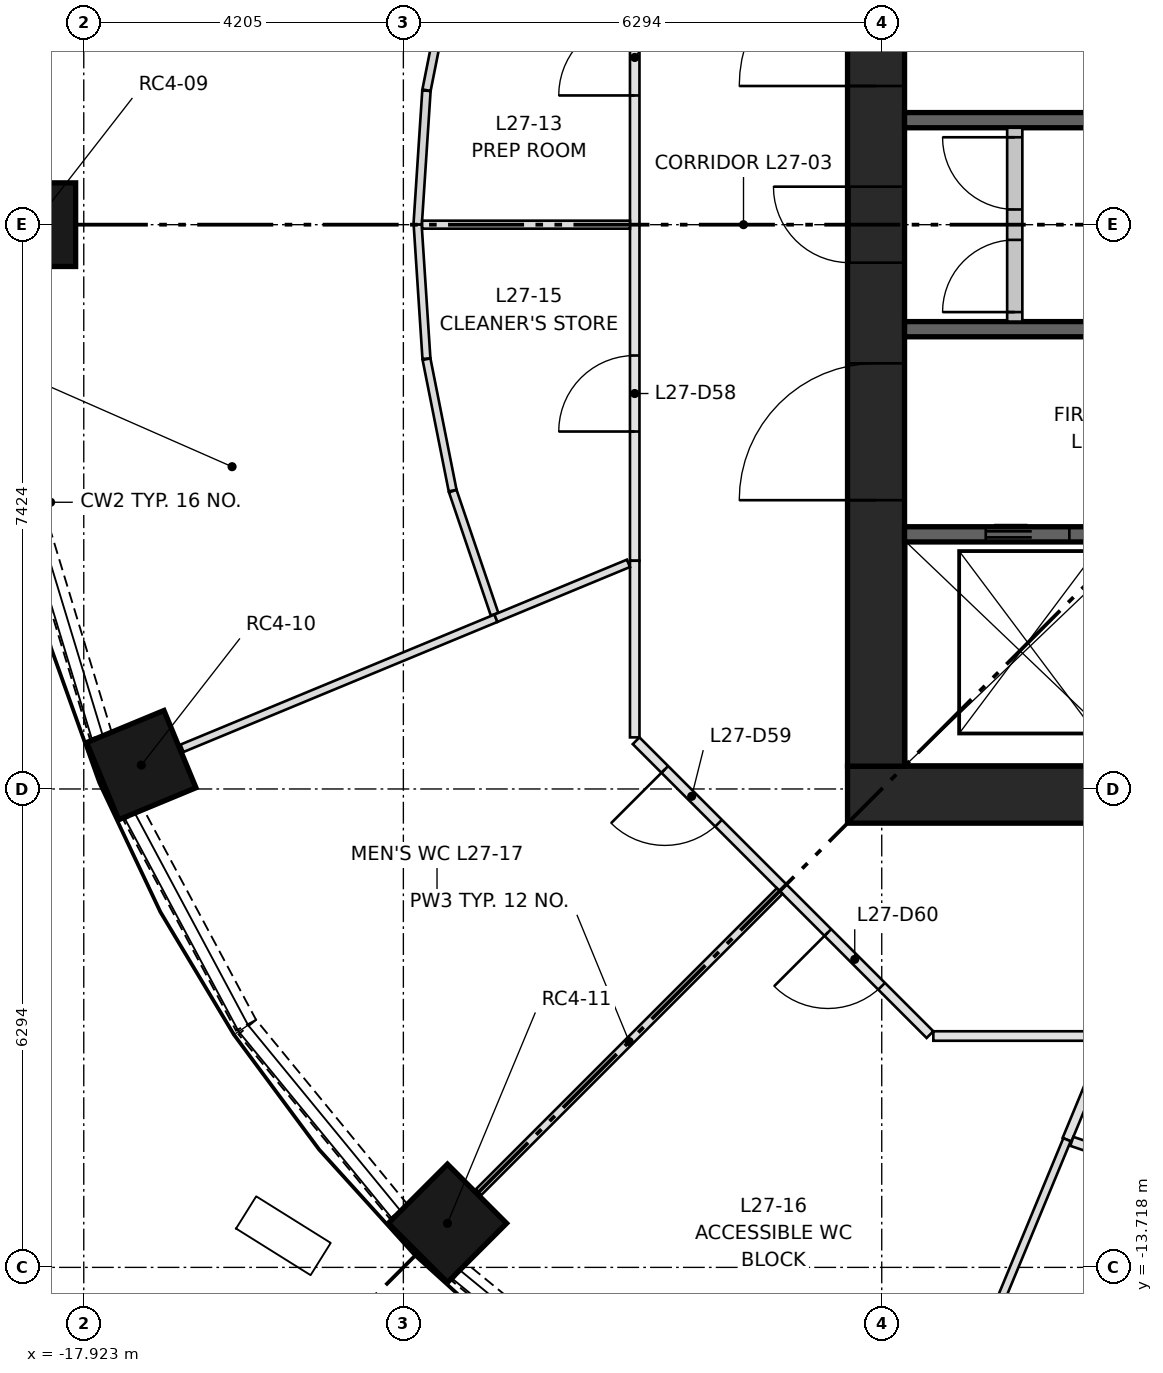
"""IFC4 building model, lengths in metres.
Left out: names, types, materials, properties, quantities, classifications, styles, units other than length and angle.
Written with IfcOpenShell. Run it as: python <this file> out.ifc"""

import sys

from ifc_helpers import new_model, si_unit, direction, frame, frame_2d, origin, origin_2d, place, context, subcontext, project, spatial, rectangle, extrude, element, fill, save


model = new_model("IFC4")
c1 = context("Model", 3, precision=1e-05, world=origin(), true_north=direction((0.0, 1.0)))
c2 = subcontext(c1, "Body", "Model", "MODEL_VIEW")
j1 = project(units=[si_unit("LENGTHUNIT", "METRE"), si_unit("PLANEANGLEUNIT", "RADIAN")], contexts=[c1])
p1 = place(None, origin())
s1 = spatial("IfcSite", under=j1, at=p1, CompositionType="ELEMENT")
p2 = place(p1, origin())
s2 = spatial("IfcBuilding", under=s1, at=p2, CompositionType="ELEMENT")
p3 = place(p2, frame((0.0, 0.0, 105.6)))
s3 = spatial("IfcBuildingStorey", under=s2, at=p3, CompositionType="ELEMENT", Elevation=105.6)
for number, where, z_axis, x_axis in (
    (1, (-18.58, 0.0, 0.0), (0.0, 0.0, 1.0), (-1.0, 0.0, 0.0)),
    (2, (-17.166, -7.11, 0.0), (0.0, 0.0, 1.0), (-0.924, -0.383, 0.0)),
    (3, (-13.138, -13.138, 0.0), (0.0, 0.0, 1.0), (-0.707, -0.707, 0.0)),
):
    element("IfcColumn", number, at=place(p3, frame(where, z_axis=z_axis, x_axis=x_axis)), inside=s3, PredefinedType="COLUMN", context=c2, shape_type="SweptSolid", body=[
        extrude(rectangle(XDim=1.1, YDim=1.1, at=origin_2d()), origin(), (0.0, 0.0, 1.0), 3.65),
    ])
p4 = place(p3, frame((-7.874, -7.499, 0.0), z_axis=(0.0, 0.0, 1.0), x_axis=(1.0, 0.0, 0.0)))
e4 = element("IfcWall", 4, at=p4, inside=s3, PredefinedType="SHEAR", context=c2, shape_type="SweptSolid", body=[
    extrude(rectangle(XDim=15.748, YDim=0.75, at=frame_2d((7.874, 0.0))), origin(), (0.0, 0.0, 1.0), 3.65),
])
p5 = place(p3, frame((-7.499, -7.124, 0.0), z_axis=(0.0, 0.0, 1.0), x_axis=(0.0, 1.0, 0.0)))
e5 = element("IfcWall", 5, at=p5, inside=s3, PredefinedType="SHEAR", context=c2, shape_type="SweptSolid", body=[
    extrude(rectangle(XDim=14.248, YDim=0.75, at=frame_2d((7.124, 0.0))), origin(), (0.0, 0.0, 1.0), 3.65),
])
p6 = place(p5, frame((6.624, 0.0, 0.0)))
e6 = element("IfcOpeningElement", 6, at=p6, cuts=e5, PredefinedType="OPENING", context=c2, shape_type="SweptSolid", body=[
    extrude(rectangle(XDim=1.0, YDim=2.1, at=frame_2d((0.5, 1.05))), frame((0.0, 0.385, 0.0), z_axis=(0.0, -1.0, 0.0), x_axis=(1.0, 0.0, 0.0)), (0.0, 0.0, 1.0), 0.77),
])
p7 = place(p5, frame((3.5, 0.0, 0.0)))
e7 = element("IfcOpeningElement", 7, at=p7, cuts=e5, PredefinedType="OPENING", context=c2, shape_type="SweptSolid", body=[
    extrude(rectangle(XDim=1.8, YDim=2.1, at=frame_2d((0.9, 1.05))), frame((0.0, 0.385, 0.0), z_axis=(0.0, -1.0, 0.0), x_axis=(1.0, 0.0, 0.0)), (0.0, 0.0, 1.0), 0.77),
])
p8 = place(p5, frame((8.948, 0.0, 0.0)))
e8 = element("IfcOpeningElement", 8, at=p8, cuts=e5, PredefinedType="OPENING", context=c2, shape_type="SweptSolid", body=[
    extrude(rectangle(XDim=1.8, YDim=2.1, at=frame_2d((0.9, 1.05))), frame((0.0, 0.385, 0.0), z_axis=(0.0, -1.0, 0.0), x_axis=(1.0, 0.0, 0.0)), (0.0, 0.0, 1.0), 0.77),
])
p9 = place(p5, frame((12.124, 0.0, 0.0)))
e9 = element("IfcOpeningElement", 9, at=p9, cuts=e5, PredefinedType="OPENING", context=c2, shape_type="SweptSolid", body=[
    extrude(rectangle(XDim=1.0, YDim=2.1, at=frame_2d((0.5, 1.05))), frame((0.0, 0.385, 0.0), z_axis=(0.0, -1.0, 0.0), x_axis=(1.0, 0.0, 0.0)), (0.0, 0.0, 1.0), 0.77),
])
p10 = place(p3, frame((-7.124, -4.074, 0.0), z_axis=(0.0, 0.0, 1.0), x_axis=(1.0, 0.0, 0.0)))
e10 = element("IfcWall", 10, at=p10, inside=s3, PredefinedType="SHEAR", context=c2, shape_type="SweptSolid", body=[
    extrude(rectangle(XDim=14.248, YDim=0.2, at=frame_2d((7.124, 0.0))), origin(), (0.0, 0.0, 1.0), 3.3),
])
p11 = place(p10, frame((1.069, 0.0, 0.0)))
e11 = element("IfcOpeningElement", 11, at=p11, cuts=e10, PredefinedType="OPENING", context=c2, shape_type="SweptSolid", body=[
    extrude(rectangle(XDim=1.1, YDim=2.1, at=frame_2d((0.55, 1.05))), frame((0.0, 0.11, 0.0), z_axis=(0.0, -1.0, 0.0), x_axis=(1.0, 0.0, 0.0)), (0.0, 0.0, 1.0), 0.22),
])
p12 = place(p10, frame((4.206, 0.0, 0.0)))
e12 = element("IfcOpeningElement", 12, at=p12, cuts=e10, PredefinedType="OPENING", context=c2, shape_type="SweptSolid", body=[
    extrude(rectangle(XDim=1.1, YDim=2.1, at=frame_2d((0.55, 1.05))), frame((0.0, 0.11, 0.0), z_axis=(0.0, -1.0, 0.0), x_axis=(1.0, 0.0, 0.0)), (0.0, 0.0, 1.0), 0.22),
])
p13 = place(p10, frame((6.808, 0.0, 0.0)))
e13 = element("IfcOpeningElement", 13, at=p13, cuts=e10, PredefinedType="OPENING", context=c2, shape_type="SweptSolid", body=[
    extrude(rectangle(XDim=1.0, YDim=2.1, at=frame_2d((0.5, 1.05))), frame((0.0, 0.11, 0.0), z_axis=(0.0, -1.0, 0.0), x_axis=(1.0, 0.0, 0.0)), (0.0, 0.0, 1.0), 0.22),
])
p14 = place(p10, frame((8.777, 0.0, 0.0)))
e14 = element("IfcOpeningElement", 14, at=p14, cuts=e10, PredefinedType="OPENING", context=c2, shape_type="SweptSolid", body=[
    extrude(rectangle(XDim=1.0, YDim=2.1, at=frame_2d((0.5, 1.05))), frame((0.0, 0.11, 0.0), z_axis=(0.0, -1.0, 0.0), x_axis=(1.0, 0.0, 0.0)), (0.0, 0.0, 1.0), 0.22),
])
p15 = place(p10, frame((10.745, 0.0, 0.0)))
e15 = element("IfcOpeningElement", 15, at=p15, cuts=e10, PredefinedType="OPENING", context=c2, shape_type="SweptSolid", body=[
    extrude(rectangle(XDim=1.0, YDim=2.1, at=frame_2d((0.5, 1.05))), frame((0.0, 0.11, 0.0), z_axis=(0.0, -1.0, 0.0), x_axis=(1.0, 0.0, 0.0)), (0.0, 0.0, 1.0), 0.22),
])
p16 = place(p10, frame((12.714, 0.0, 0.0)))
e16 = element("IfcOpeningElement", 16, at=p16, cuts=e10, PredefinedType="OPENING", context=c2, shape_type="SweptSolid", body=[
    extrude(rectangle(XDim=1.0, YDim=2.1, at=frame_2d((0.5, 1.05))), frame((0.0, 0.11, 0.0), z_axis=(0.0, -1.0, 0.0), x_axis=(1.0, 0.0, 0.0)), (0.0, 0.0, 1.0), 0.22),
])
for number, where, z_axis, x_axis in (
    (17, (-7.124, -1.375, 0.0), (0.0, 0.0, 1.0), (1.0, 0.0, 0.0)),
    (18, (-7.124, 1.375, 0.0), (0.0, 0.0, 1.0), (1.0, 0.0, 0.0)),
):
    element("IfcWall", number, at=place(p3, frame(where, z_axis=z_axis, x_axis=x_axis)), inside=s3, PredefinedType="SHEAR", context=c2, shape_type="SweptSolid", body=[
        extrude(rectangle(XDim=2.75, YDim=0.2, at=frame_2d((1.375, 0.0))), origin(), (0.0, 0.0, 1.0), 3.3),
    ])
p17 = place(p3, frame((-5.674, -1.275, 0.0), z_axis=(0.0, 0.0, 1.0), x_axis=(0.0, 1.0, 0.0)))
e19 = element("IfcWall", 19, at=p17, inside=s3, PredefinedType="PARTITIONING", context=c2, shape_type="SweptSolid", body=[
    extrude(rectangle(XDim=2.55, YDim=0.2, at=frame_2d((1.275, 0.0))), origin(), (0.0, 0.0, 1.0), 3.3),
])
p18 = place(p17, frame((0.125, 0.0, 0.0)))
e20 = element("IfcOpeningElement", 20, at=p18, cuts=e19, PredefinedType="OPENING", context=c2, shape_type="SweptSolid", body=[
    extrude(rectangle(XDim=0.95, YDim=2.1, at=frame_2d((0.475, 1.05))), frame((0.0, 0.11, 0.0), z_axis=(0.0, -1.0, 0.0), x_axis=(1.0, 0.0, 0.0)), (0.0, 0.0, 1.0), 0.22),
])
p19 = place(p17, frame((1.475, 0.0, 0.0)))
e21 = element("IfcOpeningElement", 21, at=p19, cuts=e19, PredefinedType="OPENING", context=c2, shape_type="SweptSolid", body=[
    extrude(rectangle(XDim=0.95, YDim=2.1, at=frame_2d((0.475, 1.05))), frame((0.0, 0.11, 0.0), z_axis=(0.0, -1.0, 0.0), x_axis=(1.0, 0.0, 0.0)), (0.0, 0.0, 1.0), 0.22),
])
p20 = place(p3, frame((-18.611, -3.717, 0.0), z_axis=(0.0, 0.0, 1.0), x_axis=(0.290214584271, -0.956961595403, 0.0)))
e22 = element("IfcWall", 22, at=p20, inside=s3, PredefinedType="SOLIDWALL", context=c2, shape_type="SweptSolid", body=[
    extrude(rectangle(XDim=3.139, YDim=0.3, at=frame_2d((1.57, 0.0))), origin(), (0.0, 0.0, 1.0), 0.9),
])
p21 = place(p3, frame((-17.268, -7.763, 0.0), z_axis=(0.0, 0.0, 1.0), x_axis=(0.471375185282, -0.88193278355, 0.0)))
e23 = element("IfcWall", 23, at=p21, inside=s3, PredefinedType="SOLIDWALL", context=c2, shape_type="SweptSolid", body=[
    extrude(rectangle(XDim=3.139, YDim=0.3, at=frame_2d((1.57, 0.0))), origin(), (0.0, 0.0, 1.0), 0.9),
])
for number, where, z_axis, x_axis in (
    (24, (-15.771, -10.557, 0.0), (0.0, 0.0, 1.0), (0.634, -0.773, 0.0)),
    (25, (-12.983, -13.781, 0.0), (0.0, 0.0, 1.0), (0.773, -0.634, 0.0)),
):
    element("IfcWall", number, at=place(p3, frame(where, z_axis=z_axis, x_axis=x_axis)), inside=s3, PredefinedType="SOLIDWALL", context=c2, shape_type="SweptSolid", body=[
        extrude(rectangle(XDim=3.139, YDim=0.3, at=frame_2d((1.569, 0.0))), origin(), (0.0, 0.0, 1.0), 0.9),
    ])
p22 = place(p3, frame((-10.674, 0.0, 0.0), z_axis=(0.0, 0.0, 1.0), x_axis=(0.0, 1.0, 0.0)))
e26 = element("IfcWall", 26, at=p22, inside=s3, PredefinedType="PARTITIONING", context=c2, shape_type="SweptSolid", body=[
    extrude(rectangle(XDim=4.421, YDim=0.125, at=frame_2d((2.211, 0.0))), origin(), (0.0, 0.0, 1.0), 3.3),
])
p23 = place(p22, frame((1.7, 0.0, 0.0)))
e27 = element("IfcOpeningElement", 27, at=p23, cuts=e26, PredefinedType="OPENING", context=c2, shape_type="SweptSolid", body=[
    extrude(rectangle(XDim=1.0, YDim=2.1, at=frame_2d((0.5, 1.05))), frame((0.0, 0.073, 0.0), z_axis=(0.0, -1.0, 0.0), x_axis=(1.0, 0.0, 0.0)), (0.0, 0.0, 1.0), 0.145),
])
p24 = place(p3, frame((-10.674, -4.421, 0.0), z_axis=(0.0, 0.0, 1.0), x_axis=(0.0, 1.0, 0.0)))
e28 = element("IfcWall", 28, at=p24, inside=s3, PredefinedType="PARTITIONING", context=c2, shape_type="SweptSolid", body=[
    extrude(rectangle(XDim=4.421, YDim=0.125, at=frame_2d((2.211, 0.0))), origin(), (0.0, 0.0, 1.0), 3.3),
])
p25 = place(p24, frame((1.7, 0.0, 0.0)))
e29 = element("IfcOpeningElement", 29, at=p25, cuts=e28, PredefinedType="OPENING", context=c2, shape_type="SweptSolid", body=[
    extrude(rectangle(XDim=1.0, YDim=2.1, at=frame_2d((0.5, 1.05))), frame((0.0, 0.073, 0.0), z_axis=(0.0, -1.0, 0.0), x_axis=(1.0, 0.0, 0.0)), (0.0, 0.0, 1.0), 0.145),
])
p26 = place(p3, frame((-10.674, -6.745, 0.0), z_axis=(0.0, 0.0, 1.0), x_axis=(0.0, 1.0, 0.0)))
e30 = element("IfcWall", 30, at=p26, inside=s3, PredefinedType="PARTITIONING", context=c2, shape_type="SweptSolid", body=[
    extrude(rectangle(XDim=2.324, YDim=0.125, at=frame_2d((1.162, 0.0))), origin(), (0.0, 0.0, 1.0), 3.3),
])
p27 = place(p3, frame((-8.722, -8.722, 0.0), z_axis=(0.0, 0.0, 1.0), x_axis=(-0.707151428813, 0.707062130741, 0.0)))
e31 = element("IfcWall", 31, at=p27, inside=s3, PredefinedType="PARTITIONING", context=c2, shape_type="SweptSolid", body=[
    extrude(rectangle(XDim=2.734, YDim=0.125, at=frame_2d((1.367, 0.0))), origin(), (0.0, 0.0, 1.0), 3.3),
])
p28 = place(p27, frame((1.2, 0.0, 0.0)))
e32 = element("IfcOpeningElement", 32, at=p28, cuts=e31, PredefinedType="OPENING", context=c2, shape_type="SweptSolid", body=[
    extrude(rectangle(XDim=1.0, YDim=2.1, at=frame_2d((0.5, 1.05))), frame((0.0, 0.073, 0.0), z_axis=(0.0, -1.0, 0.0), x_axis=(1.0, 0.0, 0.0)), (0.0, 0.0, 1.0), 0.145),
])
p29 = place(p3, frame((-6.789, -10.656, 0.0), z_axis=(0.0, 0.0, 1.0), x_axis=(-0.707062130741, 0.707151428813, 0.0)))
e33 = element("IfcWall", 33, at=p29, inside=s3, PredefinedType="PARTITIONING", context=c2, shape_type="SweptSolid", body=[
    extrude(rectangle(XDim=2.734, YDim=0.125, at=frame_2d((1.367, 0.0))), origin(), (0.0, 0.0, 1.0), 3.3),
])
p30 = place(p29, frame((0.9, 0.0, 0.0)))
e34 = element("IfcOpeningElement", 34, at=p30, cuts=e33, PredefinedType="OPENING", context=c2, shape_type="SweptSolid", body=[
    extrude(rectangle(XDim=1.0, YDim=2.1, at=frame_2d((0.5, 1.05))), frame((0.0, 0.073, 0.0), z_axis=(0.0, -1.0, 0.0), x_axis=(1.0, 0.0, 0.0)), (0.0, 0.0, 1.0), 0.145),
])
p31 = place(p3, frame((-4.359, -10.674, 0.0), z_axis=(0.0, 0.0, 1.0), x_axis=(-1.0, 0.0, 0.0)))
e35 = element("IfcWall", 35, at=p31, inside=s3, PredefinedType="PARTITIONING", context=c2, shape_type="SweptSolid", body=[
    extrude(rectangle(XDim=2.386, YDim=0.125, at=frame_2d((1.193, 0.0))), origin(), (0.0, 0.0, 1.0), 3.3),
])
p32 = place(p3, frame((-13.53, 0.0, 0.0), z_axis=(0.0, 0.0, 1.0), x_axis=(0.06551898146, 0.997851323128, 0.0)))
e36 = element("IfcWall", 36, at=p32, inside=s3, PredefinedType="PARTITIONING", context=c2, shape_type="SweptSolid", body=[
    extrude(rectangle(XDim=1.766, YDim=0.11, at=frame_2d((0.883, 0.0))), origin(), (0.0, 0.0, 1.0), 3.3),
])
p33 = place(p3, frame((-13.414, 1.77, 0.0), z_axis=(0.0, 0.0, 1.0), x_axis=(0.195157142921, 0.980771986532, 0.0)))
e37 = element("IfcWall", 37, at=p33, inside=s3, PredefinedType="PARTITIONING", context=c2, shape_type="SweptSolid", body=[
    extrude(rectangle(XDim=1.763, YDim=0.11, at=frame_2d((0.881, 0.0))), origin(), (0.0, 0.0, 1.0), 3.3),
])
p34 = place(p3, frame((-10.737, 0.0, 0.0), z_axis=(0.0, 0.0, 1.0), x_axis=(-1.0, 0.0, 0.0)))
e38 = element("IfcWall", 38, at=p34, inside=s3, PredefinedType="PARTITIONING", context=c2, shape_type="SweptSolid", body=[
    extrude(rectangle(XDim=2.735, YDim=0.105, at=frame_2d((1.367, 0.0))), origin(), (0.0, 0.0, 1.0), 3.3),
])
p35 = place(p3, frame((-13.53, 0.0, 0.0), z_axis=(0.0, 0.0, 1.0), x_axis=(0.065509945756, -0.997851916372, 0.0)))
e39 = element("IfcWall", 39, at=p35, inside=s3, PredefinedType="PARTITIONING", context=c2, shape_type="SweptSolid", body=[
    extrude(rectangle(XDim=1.767, YDim=0.105, at=frame_2d((0.883, 0.0))), origin(), (0.0, 0.0, 1.0), 3.3),
])
p36 = place(p3, frame((-13.414, -1.769, 0.0), z_axis=(0.0, 0.0, 1.0), x_axis=(0.19513063546, -0.980777260699, 0.0)))
e40 = element("IfcWall", 40, at=p36, inside=s3, PredefinedType="PARTITIONING", context=c2, shape_type="SweptSolid", body=[
    extrude(rectangle(XDim=1.763, YDim=0.105, at=frame_2d((0.881, 0.0))), origin(), (0.0, 0.0, 1.0), 3.3),
])
p37 = place(p3, frame((-13.068, -3.505, 0.0), z_axis=(0.0, 0.0, 1.0), x_axis=(0.321490655205, -0.946912751322, 0.0)))
e41 = element("IfcWall", 41, at=p37, inside=s3, PredefinedType="PARTITIONING", context=c2, shape_type="SweptSolid", body=[
    extrude(rectangle(XDim=1.71, YDim=0.105, at=frame_2d((0.855, 0.0))), origin(), (0.0, 0.0, 1.0), 3.3),
])
p38 = place(p3, frame((-12.5, -5.178, 0.0), z_axis=(0.0, 0.0, 1.0), x_axis=(-0.923895686767, -0.382644430213, 0.0)))
e42 = element("IfcWall", 42, at=p38, inside=s3, PredefinedType="PARTITIONING", context=c2, shape_type="SweptSolid", body=[
    extrude(rectangle(XDim=4.47, YDim=0.105, at=frame_2d((2.235, 0.0))), origin(), (0.0, 0.0, 1.0), 3.3),
])
p39 = place(p3, frame((-10.757, -4.456, 0.0), z_axis=(0.0, 0.0, 1.0), x_axis=(-0.923874914803, -0.382694580309, 0.0)))
e43 = element("IfcWall", 43, at=p39, inside=s3, PredefinedType="PARTITIONING", context=c2, shape_type="SweptSolid", body=[
    extrude(rectangle(XDim=1.887, YDim=0.105, at=frame_2d((0.943, 0.0))), origin(), (0.0, 0.0, 1.0), 3.3),
])
p40 = place(p3, frame((-12.728, -12.728, 0.0), z_axis=(0.0, 0.0, 1.0), x_axis=(0.707106781187, 0.707106781187, 0.0)))
e44 = element("IfcWall", 44, at=p40, inside=s3, PredefinedType="PARTITIONING", context=c2, shape_type="SweptSolid", body=[
    extrude(rectangle(XDim=5.602, YDim=0.105, at=frame_2d((2.801, 0.0))), origin(), (0.0, 0.0, 1.0), 3.3),
])
p41 = place(p3, frame((-4.457, -10.76, 0.0), z_axis=(0.0, 0.0, 1.0), x_axis=(-0.382746785562, -0.923853288213, 0.0)))
e45 = element("IfcWall", 45, at=p41, inside=s3, PredefinedType="PARTITIONING", context=c2, shape_type="SweptSolid", body=[
    extrude(rectangle(XDim=1.383, YDim=0.125, at=frame_2d((0.691, 0.0))), origin(), (0.0, 0.0, 1.0), 3.3),
])
p42 = place(p3, frame((-4.986, -12.038, 0.0), z_axis=(0.0, 0.0, 1.0), x_axis=(-0.38266126553, -0.923888714003, 0.0)))
e46 = element("IfcWall", 46, at=p42, inside=s3, PredefinedType="PARTITIONING", context=c2, shape_type="SweptSolid", body=[
    extrude(rectangle(XDim=4.97, YDim=0.105, at=frame_2d((2.485, 0.0))), origin(), (0.0, 0.0, 1.0), 3.3),
])
p43 = place(p3, frame((-3.376, -12.585, 0.0), z_axis=(0.0, 0.0, 1.0), x_axis=(-0.946920220616, 0.321468654442, 0.0)))
e47 = element("IfcWall", 47, at=p43, inside=s3, PredefinedType="PARTITIONING", context=c2, shape_type="SweptSolid", body=[
    extrude(rectangle(XDim=1.634, YDim=0.125, at=frame_2d((0.817, 0.0))), origin(), (0.0, 0.0, 1.0), 3.3),
])
p44 = place(p11, origin())
e48 = element("IfcDoor", 48, at=p44, inside=s3, OperationType="DOUBLE_DOOR_SLIDING", PredefinedType="DOOR", context=c2, shape_type="SweptSolid", body=[
    extrude(rectangle(XDim=1.1, YDim=2.1, at=frame_2d((0.55, 1.05))), frame((0.0, 0.025, 0.0), z_axis=(0.0, -1.0, 0.0), x_axis=(1.0, 0.0, 0.0)), (0.0, 0.0, 1.0), 0.05),
])
fill(e11, e48)
p45 = place(p18, origin())
e49 = element("IfcDoor", 49, at=p45, inside=s3, OperationType="SINGLE_SWING_LEFT", PredefinedType="DOOR", context=c2, shape_type="SweptSolid", body=[
    extrude(rectangle(XDim=0.95, YDim=2.1, at=frame_2d((0.475, 1.05))), frame((0.0, 0.025, 0.0), z_axis=(0.0, -1.0, 0.0), x_axis=(1.0, 0.0, 0.0)), (0.0, 0.0, 1.0), 0.05),
])
fill(e20, e49)
p46 = place(p19, origin())
e50 = element("IfcDoor", 50, at=p46, inside=s3, OperationType="SINGLE_SWING_RIGHT", PredefinedType="DOOR", context=c2, shape_type="SweptSolid", body=[
    extrude(rectangle(XDim=0.95, YDim=2.1, at=frame_2d((0.475, 1.05))), frame((0.0, 0.025, 0.0), z_axis=(0.0, -1.0, 0.0), x_axis=(1.0, 0.0, 0.0)), (0.0, 0.0, 1.0), 0.05),
])
fill(e21, e50)
p47 = place(p6, origin())
e51 = element("IfcDoor", 51, at=p47, inside=s3, OperationType="SINGLE_SWING_RIGHT", PredefinedType="DOOR", context=c2, shape_type="SweptSolid", body=[
    extrude(rectangle(XDim=1.0, YDim=2.1, at=frame_2d((0.5, 1.05))), frame((0.0, 0.375, 0.0), z_axis=(0.0, -1.0, 0.0), x_axis=(1.0, 0.0, 0.0)), (0.0, 0.0, 1.0), 0.05),
])
fill(e6, e51)
p48 = place(p7, origin())
e52 = element("IfcDoor", 52, at=p48, inside=s3, OperationType="DOUBLE_DOOR_SINGLE_SWING", PredefinedType="DOOR", context=c2, shape_type="SweptSolid", body=[
    extrude(rectangle(XDim=1.8, YDim=2.1, at=frame_2d((0.9, 1.05))), frame((0.0, 0.025, 0.0), z_axis=(0.0, -1.0, 0.0), x_axis=(1.0, 0.0, 0.0)), (0.0, 0.0, 1.0), 0.05),
])
fill(e7, e52)
p49 = place(p8, origin())
e53 = element("IfcDoor", 53, at=p49, inside=s3, OperationType="DOUBLE_DOOR_SINGLE_SWING", PredefinedType="DOOR", context=c2, shape_type="SweptSolid", body=[
    extrude(rectangle(XDim=1.8, YDim=2.1, at=frame_2d((0.9, 1.05))), frame((0.0, 0.025, 0.0), z_axis=(0.0, -1.0, 0.0), x_axis=(1.0, 0.0, 0.0)), (0.0, 0.0, 1.0), 0.05),
])
fill(e8, e53)
p50 = place(p23, origin())
e54 = element("IfcDoor", 54, at=p50, inside=s3, OperationType="SINGLE_SWING_LEFT", PredefinedType="DOOR", context=c2, shape_type="SweptSolid", body=[
    extrude(rectangle(XDim=1.0, YDim=2.1, at=frame_2d((0.5, 1.05))), frame((0.0, 0.025, 0.0), z_axis=(0.0, -1.0, 0.0), x_axis=(1.0, 0.0, 0.0)), (0.0, 0.0, 1.0), 0.05),
])
fill(e27, e54)
p51 = place(p25, origin())
e55 = element("IfcDoor", 55, at=p51, inside=s3, OperationType="SINGLE_SWING_LEFT", PredefinedType="DOOR", context=c2, shape_type="SweptSolid", body=[
    extrude(rectangle(XDim=1.0, YDim=2.1, at=frame_2d((0.5, 1.05))), frame((0.0, 0.025, 0.0), z_axis=(0.0, -1.0, 0.0), x_axis=(1.0, 0.0, 0.0)), (0.0, 0.0, 1.0), 0.05),
])
fill(e29, e55)
p52 = place(p28, origin())
e56 = element("IfcDoor", 56, at=p52, inside=s3, OperationType="SINGLE_SWING_RIGHT", PredefinedType="DOOR", context=c2, shape_type="SweptSolid", body=[
    extrude(rectangle(XDim=1.0, YDim=2.1, at=frame_2d((0.5, 1.05))), frame((0.0, 0.025, 0.0), z_axis=(0.0, -1.0, 0.0), x_axis=(1.0, 0.0, 0.0)), (0.0, 0.0, 1.0), 0.05),
])
fill(e32, e56)
p53 = place(p30, origin())
e57 = element("IfcDoor", 57, at=p53, inside=s3, OperationType="SINGLE_SWING_RIGHT", PredefinedType="DOOR", context=c2, shape_type="SweptSolid", body=[
    extrude(rectangle(XDim=1.0, YDim=2.1, at=frame_2d((0.5, 1.05))), frame((0.0, 0.025, 0.0), z_axis=(0.0, -1.0, 0.0), x_axis=(1.0, 0.0, 0.0)), (0.0, 0.0, 1.0), 0.05),
])
fill(e34, e57)
save(model, sys.argv[1])
